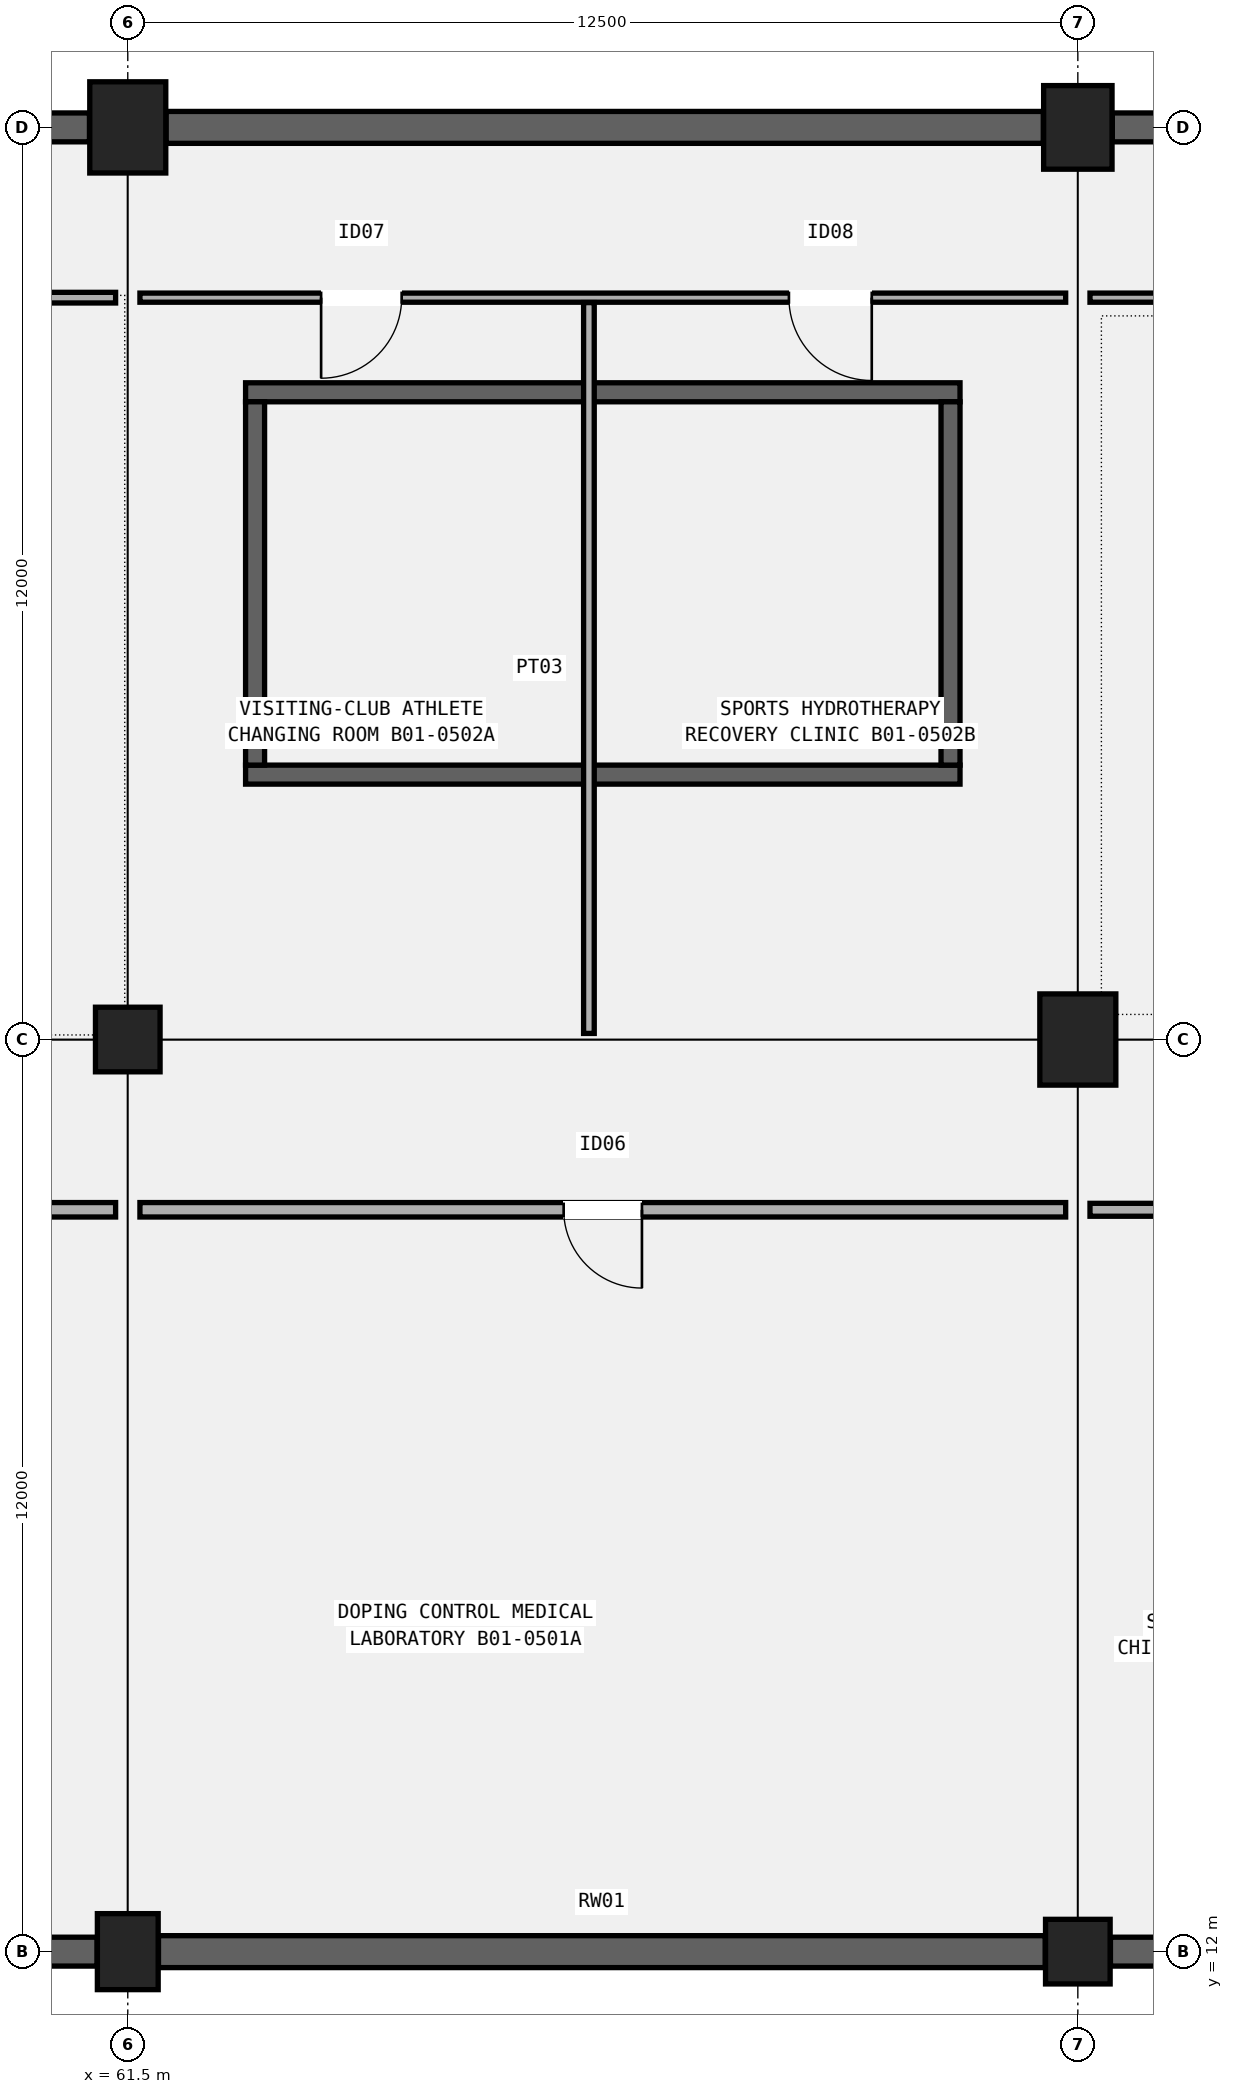
"""IFC4 building model, lengths in metres.
Left out: names, types, materials, properties, quantities, classifications, styles, units other than length and angle.
Written with IfcOpenShell. Run it as: python <this file> out.ifc"""

import sys

from ifc_helpers import new_model, si_unit, direction, frame, frame_2d, origin, origin_2d, place, context, subcontext, project, spatial, rectangle, circle, extrude, element, fill, save


model = new_model("IFC4")
c1 = context("Model", 3, precision=1e-05, world=origin(), true_north=direction((0.0, 1.0)))
c2 = subcontext(c1, "Body", "Model", "MODEL_VIEW")
j1 = project(units=[si_unit("LENGTHUNIT", "METRE"), si_unit("PLANEANGLEUNIT", "RADIAN")], contexts=[c1])
p1 = place(None, origin())
s1 = spatial("IfcSite", under=j1, at=p1, CompositionType="ELEMENT")
p2 = place(p1, origin())
s2 = spatial("IfcBuilding", under=s1, at=p2, CompositionType="ELEMENT")
p3 = place(p2, frame((0.0, 0.0, -4.8)))
s3 = spatial("IfcBuildingStorey", under=s2, at=p3, CompositionType="ELEMENT", Elevation=-4.8)
p4 = place(p3, frame((61.5, 12.0, 0.0), z_axis=(0.0, 0.0, 1.0), x_axis=(1.0, 0.0, 0.0)))
e1 = element("IfcColumn", 1, at=p4, inside=s3, PredefinedType="COLUMN", context=c2, shape_type="SweptSolid", body=[
    extrude(rectangle(XDim=0.8, YDim=1.0, at=origin_2d()), origin(), (0.0, 0.0, 1.0), 4.8),
])
p5 = place(p3, frame((61.5, 24.0, 0.0), z_axis=(0.0, 0.0, 1.0), x_axis=(1.0, 0.0, 0.0)))
e2 = element("IfcColumn", 2, at=p5, inside=s3, PredefinedType="COLUMN", context=c2, shape_type="SweptSolid", body=[
    extrude(circle(Radius=0.425, at=origin_2d()), origin(), (0.0, 0.0, 1.0), 4.8),
])
p6 = place(p3, frame((61.5, 36.0, 0.0), z_axis=(0.0, 0.0, 1.0), x_axis=(1.0, 0.0, 0.0)))
e3 = element("IfcColumn", 3, at=p6, inside=s3, PredefinedType="COLUMN", context=c2, shape_type="SweptSolid", body=[
    extrude(rectangle(XDim=1.0, YDim=1.2, at=origin_2d()), origin(), (0.0, 0.0, 1.0), 4.8),
])
p7 = place(p3, frame((74.0, 12.0, 0.0), z_axis=(0.0, 0.0, 1.0), x_axis=(1.0, 0.0, 0.0)))
e4 = element("IfcColumn", 4, at=p7, inside=s3, PredefinedType="COLUMN", context=c2, shape_type="SweptSolid", body=[
    extrude(circle(Radius=0.425, at=origin_2d()), origin(), (0.0, 0.0, 1.0), 4.8),
])
p8 = place(p3, frame((74.0, 24.0, 0.0), z_axis=(0.0, 0.0, 1.0), x_axis=(1.0, 0.0, 0.0)))
e5 = element("IfcColumn", 5, at=p8, inside=s3, PredefinedType="COLUMN", context=c2, shape_type="SweptSolid", body=[
    extrude(rectangle(XDim=1.0, YDim=1.2, at=origin_2d()), origin(), (0.0, 0.0, 1.0), 4.8),
])
p9 = place(p3, frame((74.0, 36.0, 0.0), z_axis=(0.0, 0.0, 1.0), x_axis=(1.0, 0.0, 0.0)))
e6 = element("IfcColumn", 6, at=p9, inside=s3, PredefinedType="COLUMN", context=c2, shape_type="SweptSolid", body=[
    extrude(rectangle(XDim=0.9, YDim=1.1, at=origin_2d()), origin(), (0.0, 0.0, 1.0), 4.8),
])
p10 = place(p3, frame((49.454, 12.0, 0.0), z_axis=(0.0, 0.0, 1.0), x_axis=(1.0, 0.0, 0.0)))
e7 = element("IfcWall", 7, at=p10, inside=s3, PredefinedType="STANDARD", context=c2, shape_type="SweptSolid", body=[
    extrude(rectangle(XDim=11.642, YDim=0.38, at=frame_2d((5.821, 0.0))), origin(), (0.0, 0.0, 1.0), 4.46),
])
p11 = place(p3, frame((49.429, 36.0, 0.0), z_axis=(0.0, 0.0, 1.0), x_axis=(1.0, 0.0, 0.0)))
e8 = element("IfcWall", 8, at=p11, inside=s3, PredefinedType="STANDARD", context=c2, shape_type="SweptSolid", body=[
    extrude(rectangle(XDim=11.567, YDim=0.38, at=frame_2d((5.784, 0.0))), origin(), (0.0, 0.0, 1.0), 4.46),
])
p12 = place(p3, frame((61.904, 12.0, 0.0), z_axis=(0.0, 0.0, 1.0), x_axis=(1.0, 0.0, 0.0)))
e9 = element("IfcWall", 9, at=p12, inside=s3, PredefinedType="STANDARD", context=c2, shape_type="SweptSolid", body=[
    extrude(rectangle(XDim=11.667, YDim=0.42, at=frame_2d((5.833, 0.0))), origin(), (0.0, 0.0, 1.0), 4.46),
])
p13 = place(p3, frame((62.004, 36.0, 0.0), z_axis=(0.0, 0.0, 1.0), x_axis=(1.0, 0.0, 0.0)))
e10 = element("IfcWall", 10, at=p13, inside=s3, PredefinedType="STANDARD", context=c2, shape_type="SweptSolid", body=[
    extrude(rectangle(XDim=11.542, YDim=0.42, at=frame_2d((5.771, 0.0))), origin(), (0.0, 0.0, 1.0), 4.46),
])
p14 = place(p3, frame((74.429, 12.0, 0.0), z_axis=(0.0, 0.0, 1.0), x_axis=(1.0, 0.0, 0.0)))
e11 = element("IfcWall", 11, at=p14, inside=s3, PredefinedType="STANDARD", context=c2, shape_type="SweptSolid", body=[
    extrude(rectangle(XDim=11.567, YDim=0.38, at=frame_2d((5.784, 0.0))), origin(), (0.0, 0.0, 1.0), 4.46),
])
p15 = place(p3, frame((74.454, 36.0, 0.0), z_axis=(0.0, 0.0, 1.0), x_axis=(1.0, 0.0, 0.0)))
e12 = element("IfcWall", 12, at=p15, inside=s3, PredefinedType="STANDARD", context=c2, shape_type="SweptSolid", body=[
    extrude(rectangle(XDim=11.642, YDim=0.38, at=frame_2d((5.821, 0.0))), origin(), (0.0, 0.0, 1.0), 4.46),
])
for number, where, z_axis, x_axis in (
    (13, (63.05, 27.485, 0.0), (0.0, 0.0, 1.0), (1.0, 0.0, 0.0)),
    (14, (63.05, 32.515, 0.0), (0.0, 0.0, 1.0), (1.0, 0.0, 0.0)),
):
    element("IfcWall", number, at=place(p3, frame(where, z_axis=z_axis, x_axis=x_axis)), inside=s3, PredefinedType="SHEAR", context=c2, shape_type="SweptSolid", body=[
        extrude(rectangle(XDim=9.4, YDim=0.25, at=frame_2d((4.7, 0.0))), origin(), (0.0, 0.0, 1.0), 4.5),
    ])
for number, where, z_axis, x_axis in (
    (15, (63.175, 27.61, 0.0), (0.0, 0.0, 1.0), (0.0, 1.0, 0.0)),
    (16, (72.325, 27.61, 0.0), (0.0, 0.0, 1.0), (0.0, 1.0, 0.0)),
):
    element("IfcWall", number, at=place(p3, frame(where, z_axis=z_axis, x_axis=x_axis)), inside=s3, PredefinedType="SHEAR", context=c2, shape_type="SweptSolid", body=[
        extrude(rectangle(XDim=4.78, YDim=0.25, at=frame_2d((2.39, 0.0))), origin(), (0.0, 0.0, 1.0), 4.5),
    ])
p16 = place(p3, frame((51.17, 21.76, 0.0), z_axis=(0.0, 0.0, 1.0), x_axis=(1.0, 0.0, 0.0)))
e17 = element("IfcWall", 17, at=p16, inside=s3, PredefinedType="PARTITIONING", context=c2, shape_type="SweptSolid", body=[
    extrude(rectangle(XDim=10.17, YDim=0.19, at=frame_2d((5.085, 0.0))), origin(), (0.0, 0.0, 1.0), 3.92),
])
p17 = place(p16, frame((5.56, 0.0, 0.0), z_axis=(0.0, 0.0, 1.0), x_axis=(-1.0, 0.0, 0.0)))
e18 = element("IfcOpeningElement", 18, at=p17, cuts=e17, PredefinedType="OPENING", context=c2, shape_type="SweptSolid", body=[
    extrude(rectangle(XDim=0.95, YDim=2.12, at=frame_2d((0.475, 1.06))), frame((0.0, 0.105, 0.0), z_axis=(0.0, -1.0, 0.0), x_axis=(1.0, 0.0, 0.0)), (0.0, 0.0, 1.0), 0.21),
])
p18 = place(p3, frame((51.17, 33.76, 0.0), z_axis=(0.0, 0.0, 1.0), x_axis=(1.0, 0.0, 0.0)))
e19 = element("IfcWall", 19, at=p18, inside=s3, PredefinedType="PARTITIONING", context=c2, shape_type="SweptSolid", body=[
    extrude(rectangle(XDim=10.17, YDim=0.14, at=frame_2d((5.085, 0.0))), origin(), (0.0, 0.0, 1.0), 3.92),
])
p19 = place(p18, frame((2.158, 0.0, 0.0), z_axis=(0.0, 0.0, 1.0), x_axis=(-1.0, 0.0, 0.0)))
e20 = element("IfcOpeningElement", 20, at=p19, cuts=e19, PredefinedType="OPENING", context=c2, shape_type="SweptSolid", body=[
    extrude(rectangle(XDim=0.98, YDim=2.1, at=frame_2d((0.49, 1.05))), frame((0.0, 0.08, 0.0), z_axis=(0.0, -1.0, 0.0), x_axis=(1.0, 0.0, 0.0)), (0.0, 0.0, 1.0), 0.16),
])
p20 = place(p18, frame((7.333, 0.0, 0.0), z_axis=(0.0, 0.0, 1.0), x_axis=(-1.0, 0.0, 0.0)))
e21 = element("IfcOpeningElement", 21, at=p20, cuts=e19, PredefinedType="OPENING", context=c2, shape_type="SweptSolid", body=[
    extrude(rectangle(XDim=1.0, YDim=2.14, at=frame_2d((0.5, 1.07))), frame((0.0, 0.08, 0.0), z_axis=(0.0, -1.0, 0.0), x_axis=(1.0, 0.0, 0.0)), (0.0, 0.0, 1.0), 0.16),
])
p21 = place(p3, frame((61.66, 21.76, 0.0), z_axis=(0.0, 0.0, 1.0), x_axis=(1.0, 0.0, 0.0)))
e22 = element("IfcWall", 22, at=p21, inside=s3, PredefinedType="PARTITIONING", context=c2, shape_type="SweptSolid", body=[
    extrude(rectangle(XDim=12.18, YDim=0.19, at=frame_2d((6.09, 0.0))), origin(), (0.0, 0.0, 1.0), 3.92),
])
p22 = place(p21, frame((6.605, 0.0, 0.0), z_axis=(0.0, 0.0, 1.0), x_axis=(-1.0, 0.0, 0.0)))
e23 = element("IfcOpeningElement", 23, at=p22, cuts=e22, PredefinedType="OPENING", context=c2, shape_type="SweptSolid", body=[
    extrude(rectangle(XDim=1.03, YDim=2.12, at=frame_2d((0.515, 1.06))), frame((0.0, 0.105, 0.0), z_axis=(0.0, -1.0, 0.0), x_axis=(1.0, 0.0, 0.0)), (0.0, 0.0, 1.0), 0.21),
])
p23 = place(p3, frame((61.66, 33.76, 0.0), z_axis=(0.0, 0.0, 1.0), x_axis=(1.0, 0.0, 0.0)))
e24 = element("IfcWall", 24, at=p23, inside=s3, PredefinedType="PARTITIONING", context=c2, shape_type="SweptSolid", body=[
    extrude(rectangle(XDim=12.18, YDim=0.12, at=frame_2d((6.09, 0.0))), origin(), (0.0, 0.0, 1.0), 3.92),
])
p24 = place(p23, frame((3.444, 0.0, 0.0), z_axis=(0.0, 0.0, 1.0), x_axis=(-1.0, 0.0, 0.0)))
e25 = element("IfcOpeningElement", 25, at=p24, cuts=e24, PredefinedType="OPENING", context=c2, shape_type="SweptSolid", body=[
    extrude(rectangle(XDim=1.06, YDim=2.15, at=frame_2d((0.53, 1.075))), frame((0.0, 0.07, 0.0), z_axis=(0.0, -1.0, 0.0), x_axis=(1.0, 0.0, 0.0)), (0.0, 0.0, 1.0), 0.14),
])
p25 = place(p23, frame((9.629, 0.0, 0.0), z_axis=(0.0, 0.0, 1.0), x_axis=(-1.0, 0.0, 0.0)))
e26 = element("IfcOpeningElement", 26, at=p25, cuts=e24, PredefinedType="OPENING", context=c2, shape_type="SweptSolid", body=[
    extrude(rectangle(XDim=1.09, YDim=2.16, at=frame_2d((0.545, 1.08))), frame((0.0, 0.07, 0.0), z_axis=(0.0, -1.0, 0.0), x_axis=(1.0, 0.0, 0.0)), (0.0, 0.0, 1.0), 0.14),
])
p26 = place(p3, frame((67.567, 24.08, 0.0), z_axis=(0.0, 0.0, 1.0), x_axis=(0.0, 1.0, 0.0)))
e27 = element("IfcWall", 27, at=p26, inside=s3, PredefinedType="PARTITIONING", context=c2, shape_type="SweptSolid", body=[
    extrude(rectangle(XDim=9.615, YDim=0.14, at=frame_2d((4.808, 0.0))), origin(), (0.0, 0.0, 1.0), 3.92),
])
p27 = place(p3, frame((74.16, 21.76, 0.0), z_axis=(0.0, 0.0, 1.0), x_axis=(1.0, 0.0, 0.0)))
e28 = element("IfcWall", 28, at=p27, inside=s3, PredefinedType="PARTITIONING", context=c2, shape_type="SweptSolid", body=[
    extrude(rectangle(XDim=12.18, YDim=0.17, at=frame_2d((6.09, 0.0))), origin(), (0.0, 0.0, 1.0), 3.92),
])
p28 = place(p27, frame((2.676, 0.0, 0.0), z_axis=(0.0, 0.0, 1.0), x_axis=(-1.0, 0.0, 0.0)))
e29 = element("IfcOpeningElement", 29, at=p28, cuts=e28, PredefinedType="OPENING", context=c2, shape_type="SweptSolid", body=[
    extrude(rectangle(XDim=1.12, YDim=2.18, at=frame_2d((0.56, 1.09))), frame((0.0, 0.095, 0.0), z_axis=(0.0, -1.0, 0.0), x_axis=(1.0, 0.0, 0.0)), (0.0, 0.0, 1.0), 0.19),
])
p29 = place(p27, frame((8.861, 0.0, 0.0), z_axis=(0.0, 0.0, 1.0), x_axis=(-1.0, 0.0, 0.0)))
e30 = element("IfcOpeningElement", 30, at=p29, cuts=e28, PredefinedType="OPENING", context=c2, shape_type="SweptSolid", body=[
    extrude(rectangle(XDim=1.15, YDim=2.15, at=frame_2d((0.575, 1.075))), frame((0.0, 0.095, 0.0), z_axis=(0.0, -1.0, 0.0), x_axis=(1.0, 0.0, 0.0)), (0.0, 0.0, 1.0), 0.19),
])
p30 = place(p3, frame((74.16, 33.76, 0.0), z_axis=(0.0, 0.0, 1.0), x_axis=(1.0, 0.0, 0.0)))
e31 = element("IfcWall", 31, at=p30, inside=s3, PredefinedType="PARTITIONING", context=c2, shape_type="SweptSolid", body=[
    extrude(rectangle(XDim=12.18, YDim=0.12, at=frame_2d((6.09, 0.0))), origin(), (0.0, 0.0, 1.0), 3.92),
])
p31 = place(p30, frame((3.808, 0.0, 0.0), z_axis=(0.0, 0.0, 1.0), x_axis=(-1.0, 0.0, 0.0)))
e32 = element("IfcOpeningElement", 32, at=p31, cuts=e31, PredefinedType="OPENING", context=c2, shape_type="SweptSolid", body=[
    extrude(rectangle(XDim=1.18, YDim=2.2, at=frame_2d((0.59, 1.1))), frame((0.0, 0.07, 0.0), z_axis=(0.0, -1.0, 0.0), x_axis=(1.0, 0.0, 0.0)), (0.0, 0.0, 1.0), 0.14),
])
p32 = place(p30, frame((9.993, 0.0, 0.0), z_axis=(0.0, 0.0, 1.0), x_axis=(-1.0, 0.0, 0.0)))
e33 = element("IfcOpeningElement", 33, at=p32, cuts=e31, PredefinedType="OPENING", context=c2, shape_type="SweptSolid", body=[
    extrude(rectangle(XDim=1.21, YDim=2.18, at=frame_2d((0.605, 1.09))), frame((0.0, 0.07, 0.0), z_axis=(0.0, -1.0, 0.0), x_axis=(1.0, 0.0, 0.0)), (0.0, 0.0, 1.0), 0.14),
])
p33 = place(p22, origin())
e34 = element("IfcDoor", 34, at=p33, inside=s3, OperationType="SINGLE_SWING_LEFT", PredefinedType="DOOR", context=c2, shape_type="SweptSolid", body=[
    extrude(rectangle(XDim=1.03, YDim=2.12, at=frame_2d((0.515, 1.06))), frame((0.0, 0.025, 0.0), z_axis=(0.0, -1.0, 0.0), x_axis=(1.0, 0.0, 0.0)), (0.0, 0.0, 1.0), 0.05),
])
fill(e23, e34)
p34 = place(p24, origin())
e35 = element("IfcDoor", 35, at=p34, inside=s3, OperationType="SINGLE_SWING_RIGHT", PredefinedType="DOOR", context=c2, shape_type="SweptSolid", body=[
    extrude(rectangle(XDim=1.06, YDim=2.15, at=frame_2d((0.53, 1.075))), frame((0.0, 0.025, 0.0), z_axis=(0.0, -1.0, 0.0), x_axis=(1.0, 0.0, 0.0)), (0.0, 0.0, 1.0), 0.05),
])
fill(e25, e35)
p35 = place(p25, origin())
e36 = element("IfcDoor", 36, at=p35, inside=s3, OperationType="SINGLE_SWING_LEFT", PredefinedType="DOOR", context=c2, shape_type="SweptSolid", body=[
    extrude(rectangle(XDim=1.09, YDim=2.16, at=frame_2d((0.545, 1.08))), frame((0.0, 0.025, 0.0), z_axis=(0.0, -1.0, 0.0), x_axis=(1.0, 0.0, 0.0)), (0.0, 0.0, 1.0), 0.05),
])
fill(e26, e36)
save(model, sys.argv[1])
